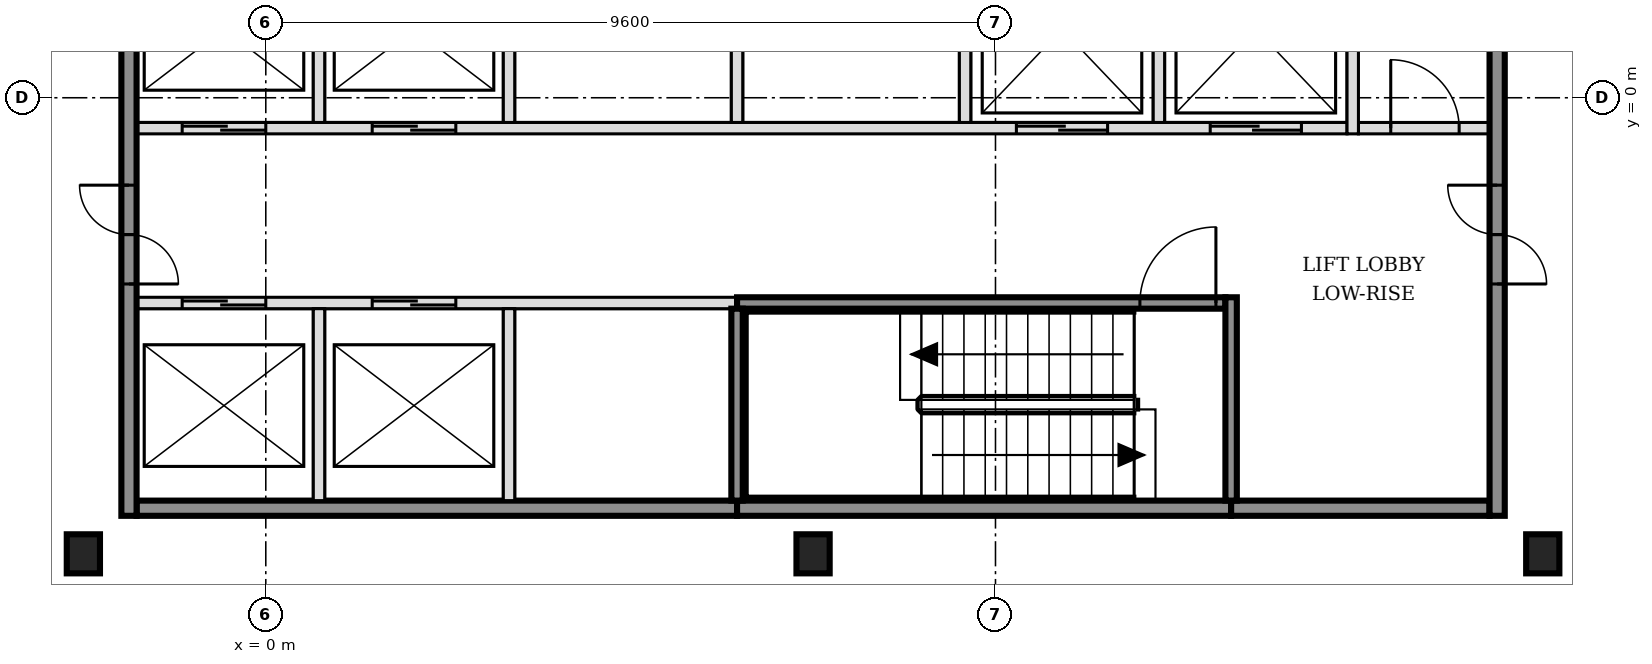
"""IFC4 building model, lengths in metres.
Left out: names, types, materials, properties, quantities, classifications, styles, units other than length and angle.
Written with IfcOpenShell. Run it as: python <this file> out.ifc"""

import sys

from ifc_helpers import new_model, si_unit, direction, frame, frame_2d, origin, origin_2d, place, context, subcontext, project, spatial, rectangle, i_section, extrude, element, fill, save


model = new_model("IFC4")
c1 = context("Model", 3, precision=1e-05, world=origin(), true_north=direction((0.0, 1.0)))
c2 = subcontext(c1, "Body", "Model", "MODEL_VIEW")
j1 = project(units=[si_unit("LENGTHUNIT", "METRE"), si_unit("PLANEANGLEUNIT", "RADIAN")], contexts=[c1])
p1 = place(None, origin())
s1 = spatial("IfcSite", under=j1, at=p1, CompositionType="ELEMENT")
p2 = place(p1, origin())
s2 = spatial("IfcBuilding", under=s1, at=p2, CompositionType="ELEMENT")
p3 = place(p2, frame((0.0, 0.0, 94.2)))
s3 = spatial("IfcBuildingStorey", under=s2, at=p3, CompositionType="ELEMENT", Elevation=94.2)
for number, where, z_axis, x_axis in (
    (1, (-2.4, -6.0, -0.15), (0.0, 0.0, 1.0), (1.0, 0.0, 0.0)),
    (2, (7.2, -6.0, -0.15), (0.0, 0.0, 1.0), (1.0, 0.0, 0.0)),
    (3, (16.8, -6.0, -0.15), (0.0, 0.0, 1.0), (1.0, 0.0, 0.0)),
):
    element("IfcColumn", number, at=place(p3, frame(where, z_axis=z_axis, x_axis=x_axis)), inside=s3, PredefinedType="COLUMN", context=c2, shape_type="SweptSolid", body=[
        extrude(i_section(OverallWidth=0.437, OverallDepth=0.514, WebThickness=0.061, FlangeThickness=0.097, FilletRadius=0.015, at=origin_2d()), origin(), (0.0, 0.0, 1.0), 3.6),
    ])
p4 = place(p3, frame((-1.7, -5.4, 0.0), z_axis=(0.0, 0.0, 1.0), x_axis=(1.0, 0.0, 0.0)))
e4 = element("IfcWall", 4, at=p4, inside=s3, PredefinedType="SOLIDWALL", context=c2, shape_type="SweptSolid", body=[
    extrude(rectangle(XDim=7.9, YDim=0.2, at=frame_2d((3.95, 0.0))), origin(), (0.0, 0.0, 1.0), 3.45),
])
p5 = place(p3, frame((6.2, -5.4, 0.0), z_axis=(0.0, 0.0, 1.0), x_axis=(1.0, 0.0, 0.0)))
e5 = element("IfcWall", 5, at=p5, inside=s3, PredefinedType="SOLIDWALL", context=c2, shape_type="SweptSolid", body=[
    extrude(rectangle(XDim=6.5, YDim=0.2, at=frame_2d((3.25, 0.0))), origin(), (0.0, 0.0, 1.0), 3.45),
])
p6 = place(p3, frame((12.7, -5.4, 0.0), z_axis=(0.0, 0.0, 1.0), x_axis=(1.0, 0.0, 0.0)))
e6 = element("IfcWall", 6, at=p6, inside=s3, PredefinedType="SOLIDWALL", context=c2, shape_type="SweptSolid", body=[
    extrude(rectangle(XDim=3.4, YDim=0.2, at=frame_2d((1.7, 0.0))), origin(), (0.0, 0.0, 1.0), 3.45),
])
p7 = place(p3, frame((-1.7, -2.7, 0.0), z_axis=(0.0, 0.0, 1.0), x_axis=(1.0, 0.0, 0.0)))
e7 = element("IfcWall", 7, at=p7, inside=s3, PredefinedType="SOLIDWALL", context=c2, shape_type="SweptSolid", body=[
    extrude(rectangle(XDim=7.9, YDim=0.15, at=frame_2d((3.95, 0.0))), origin(), (0.0, 0.0, 1.0), 3.45),
])
p8 = place(p7, frame((0.6, 0.0, 0.0)))
e8 = element("IfcOpeningElement", 8, at=p8, cuts=e7, PredefinedType="OPENING", context=c2, shape_type="SweptSolid", body=[
    extrude(rectangle(XDim=1.1, YDim=2.1, at=frame_2d((0.55, 1.05))), frame((0.0, 0.085, 0.0), z_axis=(0.0, -1.0, 0.0), x_axis=(1.0, 0.0, 0.0)), (0.0, 0.0, 1.0), 0.17),
])
p9 = place(p7, frame((3.1, 0.0, 0.0)))
e9 = element("IfcOpeningElement", 9, at=p9, cuts=e7, PredefinedType="OPENING", context=c2, shape_type="SweptSolid", body=[
    extrude(rectangle(XDim=1.1, YDim=2.1, at=frame_2d((0.55, 1.05))), frame((0.0, 0.085, 0.0), z_axis=(0.0, -1.0, 0.0), x_axis=(1.0, 0.0, 0.0)), (0.0, 0.0, 1.0), 0.17),
])
p10 = place(p3, frame((6.2, -2.7, 0.0), z_axis=(0.0, 0.0, 1.0), x_axis=(1.0, 0.0, 0.0)))
e10 = element("IfcWall", 10, at=p10, inside=s3, PredefinedType="SOLIDWALL", context=c2, shape_type="SweptSolid", body=[
    extrude(rectangle(XDim=6.425, YDim=0.15, at=frame_2d((3.212, 0.0))), origin(), (0.0, 0.0, 1.0), 3.45),
])
p11 = place(p10, frame((5.3, 0.0, 0.0)))
e11 = element("IfcOpeningElement", 11, at=p11, cuts=e10, PredefinedType="OPENING", context=c2, shape_type="SweptSolid", body=[
    extrude(rectangle(XDim=1.0, YDim=2.1, at=frame_2d((0.5, 1.05))), frame((0.0, 0.085, 0.0), z_axis=(0.0, -1.0, 0.0), x_axis=(1.0, 0.0, 0.0)), (0.0, 0.0, 1.0), 0.17),
])
p12 = place(p3, frame((-1.7, -0.4, 0.0), z_axis=(0.0, 0.0, 1.0), x_axis=(1.0, 0.0, 0.0)))
e12 = element("IfcWall", 12, at=p12, inside=s3, PredefinedType="SOLIDWALL", context=c2, shape_type="SweptSolid", body=[
    extrude(rectangle(XDim=15.925, YDim=0.15, at=frame_2d((7.962, 0.0))), origin(), (0.0, 0.0, 1.0), 3.45),
])
p13 = place(p12, frame((0.6, 0.0, 0.0)))
e13 = element("IfcOpeningElement", 13, at=p13, cuts=e12, PredefinedType="OPENING", context=c2, shape_type="SweptSolid", body=[
    extrude(rectangle(XDim=1.1, YDim=2.1, at=frame_2d((0.55, 1.05))), frame((0.0, 0.085, 0.0), z_axis=(0.0, -1.0, 0.0), x_axis=(1.0, 0.0, 0.0)), (0.0, 0.0, 1.0), 0.17),
])
p14 = place(p12, frame((3.1, 0.0, 0.0)))
e14 = element("IfcOpeningElement", 14, at=p14, cuts=e12, PredefinedType="OPENING", context=c2, shape_type="SweptSolid", body=[
    extrude(rectangle(XDim=1.1, YDim=2.1, at=frame_2d((0.55, 1.05))), frame((0.0, 0.085, 0.0), z_axis=(0.0, -1.0, 0.0), x_axis=(1.0, 0.0, 0.0)), (0.0, 0.0, 1.0), 0.17),
])
p15 = place(p12, frame((11.575, 0.0, 0.0)))
e15 = element("IfcOpeningElement", 15, at=p15, cuts=e12, PredefinedType="OPENING", context=c2, shape_type="SweptSolid", body=[
    extrude(rectangle(XDim=1.2, YDim=2.1, at=frame_2d((0.6, 1.05))), frame((0.0, 0.085, 0.0), z_axis=(0.0, -1.0, 0.0), x_axis=(1.0, 0.0, 0.0)), (0.0, 0.0, 1.0), 0.17),
])
p16 = place(p12, frame((14.125, 0.0, 0.0)))
e16 = element("IfcOpeningElement", 16, at=p16, cuts=e12, PredefinedType="OPENING", context=c2, shape_type="SweptSolid", body=[
    extrude(rectangle(XDim=1.2, YDim=2.1, at=frame_2d((0.6, 1.05))), frame((0.0, 0.085, 0.0), z_axis=(0.0, -1.0, 0.0), x_axis=(1.0, 0.0, 0.0)), (0.0, 0.0, 1.0), 0.17),
])
p17 = place(p3, frame((14.375, -0.4, 0.0), z_axis=(0.0, 0.0, 1.0), x_axis=(1.0, 0.0, 0.0)))
e17 = element("IfcWall", 17, at=p17, inside=s3, PredefinedType="PARTITIONING", context=c2, shape_type="SweptSolid", body=[
    extrude(rectangle(XDim=1.725, YDim=0.15, at=frame_2d((0.863, 0.0))), origin(), (0.0, 0.0, 1.0), 3.45),
])
p18 = place(p17, frame((0.425, 0.0, 0.0)))
e18 = element("IfcOpeningElement", 18, at=p18, cuts=e17, PredefinedType="OPENING", context=c2, shape_type="SweptSolid", body=[
    extrude(rectangle(XDim=0.9, YDim=2.1, at=frame_2d((0.45, 1.05))), frame((0.0, 0.085, 0.0), z_axis=(0.0, -1.0, 0.0), x_axis=(1.0, 0.0, 0.0)), (0.0, 0.0, 1.0), 0.17),
])
p19 = place(p3, frame((-1.8, -5.5, 0.0), z_axis=(0.0, 0.0, 1.0), x_axis=(0.0, 1.0, 0.0)))
e19 = element("IfcWall", 19, at=p19, inside=s3, PredefinedType="SOLIDWALL", context=c2, shape_type="SweptSolid", body=[
    extrude(rectangle(XDim=15.8, YDim=0.2, at=frame_2d((7.9, 0.0))), origin(), (0.0, 0.0, 1.0), 3.45),
])
p20 = place(p19, frame((3.05, 0.0, 0.0)))
e20 = element("IfcOpeningElement", 20, at=p20, cuts=e19, PredefinedType="OPENING", context=c2, shape_type="SweptSolid", body=[
    extrude(rectangle(XDim=1.3, YDim=2.1, at=frame_2d((0.65, 1.05))), frame((0.0, 0.11, 0.0), z_axis=(0.0, -1.0, 0.0), x_axis=(1.0, 0.0, 0.0)), (0.0, 0.0, 1.0), 0.22),
])
p21 = place(p19, frame((11.45, 0.0, 0.0)))
e21 = element("IfcOpeningElement", 21, at=p21, cuts=e19, PredefinedType="OPENING", context=c2, shape_type="SweptSolid", body=[
    extrude(rectangle(XDim=1.3, YDim=2.1, at=frame_2d((0.65, 1.05))), frame((0.0, 0.11, 0.0), z_axis=(0.0, -1.0, 0.0), x_axis=(1.0, 0.0, 0.0)), (0.0, 0.0, 1.0), 0.22),
])
p22 = place(p3, frame((0.7, -5.3, 0.0), z_axis=(0.0, 0.0, 1.0), x_axis=(0.0, 1.0, 0.0)))
e22 = element("IfcWall", 22, at=p22, inside=s3, PredefinedType="SOLIDWALL", context=c2, shape_type="SweptSolid", body=[
    extrude(rectangle(XDim=2.525, YDim=0.15, at=frame_2d((1.263, 0.0))), origin(), (0.0, 0.0, 1.0), 3.45),
])
p23 = place(p3, frame((0.7, -0.325, 0.0), z_axis=(0.0, 0.0, 1.0), x_axis=(0.0, 1.0, 0.0)))
e23 = element("IfcWall", 23, at=p23, inside=s3, PredefinedType="SOLIDWALL", context=c2, shape_type="SweptSolid", body=[
    extrude(rectangle(XDim=2.45, YDim=0.15, at=frame_2d((1.225, 0.0))), origin(), (0.0, 0.0, 1.0), 3.45),
])
p24 = place(p3, frame((3.2, -5.3, 0.0), z_axis=(0.0, 0.0, 1.0), x_axis=(0.0, 1.0, 0.0)))
e24 = element("IfcWall", 24, at=p24, inside=s3, PredefinedType="SOLIDWALL", context=c2, shape_type="SweptSolid", body=[
    extrude(rectangle(XDim=2.525, YDim=0.15, at=frame_2d((1.263, 0.0))), origin(), (0.0, 0.0, 1.0), 3.45),
])
p25 = place(p3, frame((3.2, -0.325, 0.0), z_axis=(0.0, 0.0, 1.0), x_axis=(0.0, 1.0, 0.0)))
e25 = element("IfcWall", 25, at=p25, inside=s3, PredefinedType="SOLIDWALL", context=c2, shape_type="SweptSolid", body=[
    extrude(rectangle(XDim=2.45, YDim=0.15, at=frame_2d((1.225, 0.0))), origin(), (0.0, 0.0, 1.0), 3.45),
])
p26 = place(p3, frame((6.2, -5.3, 0.0), z_axis=(0.0, 0.0, 1.0), x_axis=(0.0, 1.0, 0.0)))
e26 = element("IfcWall", 26, at=p26, inside=s3, PredefinedType="SOLIDWALL", context=c2, shape_type="SweptSolid", body=[
    extrude(rectangle(XDim=2.525, YDim=0.15, at=frame_2d((1.263, 0.0))), origin(), (0.0, 0.0, 1.0), 3.45),
])
for number, where, z_axis, x_axis in (
    (27, (6.2, -0.325, 0.0), (0.0, 0.0, 1.0), (0.0, 1.0, 0.0)),
    (28, (9.2, -0.325, 0.0), (0.0, 0.0, 1.0), (0.0, 1.0, 0.0)),
    (29, (11.75, -0.325, 0.0), (0.0, 0.0, 1.0), (0.0, 1.0, 0.0)),
):
    element("IfcWall", number, at=place(p3, frame(where, z_axis=z_axis, x_axis=x_axis)), inside=s3, PredefinedType="SOLIDWALL", context=c2, shape_type="SweptSolid", body=[
        extrude(rectangle(XDim=2.45, YDim=0.15, at=frame_2d((1.225, 0.0))), origin(), (0.0, 0.0, 1.0), 3.45),
    ])
p27 = place(p3, frame((12.7, -5.3, 0.0), z_axis=(0.0, 0.0, 1.0), x_axis=(0.0, 1.0, 0.0)))
e30 = element("IfcWall", 30, at=p27, inside=s3, PredefinedType="SOLIDWALL", context=c2, shape_type="SweptSolid", body=[
    extrude(rectangle(XDim=2.675, YDim=0.15, at=frame_2d((1.337, 0.0))), origin(), (0.0, 0.0, 1.0), 3.45),
])
p28 = place(p3, frame((14.3, -0.475, 0.0), z_axis=(0.0, 0.0, 1.0), x_axis=(0.0, 1.0, 0.0)))
e31 = element("IfcWall", 31, at=p28, inside=s3, PredefinedType="SOLIDWALL", context=c2, shape_type="SweptSolid", body=[
    extrude(rectangle(XDim=2.75, YDim=0.15, at=frame_2d((1.375, 0.0))), origin(), (0.0, 0.0, 1.0), 3.45),
])
p29 = place(p3, frame((16.2, -5.5, 0.0), z_axis=(0.0, 0.0, 1.0), x_axis=(0.0, 1.0, 0.0)))
e32 = element("IfcWall", 32, at=p29, inside=s3, PredefinedType="SOLIDWALL", context=c2, shape_type="SweptSolid", body=[
    extrude(rectangle(XDim=15.8, YDim=0.2, at=frame_2d((7.9, 0.0))), origin(), (0.0, 0.0, 1.0), 3.45),
])
p30 = place(p29, frame((3.05, 0.0, 0.0)))
e33 = element("IfcOpeningElement", 33, at=p30, cuts=e32, PredefinedType="OPENING", context=c2, shape_type="SweptSolid", body=[
    extrude(rectangle(XDim=1.3, YDim=2.1, at=frame_2d((0.65, 1.05))), frame((0.0, 0.11, 0.0), z_axis=(0.0, -1.0, 0.0), x_axis=(1.0, 0.0, 0.0)), (0.0, 0.0, 1.0), 0.22),
])
p31 = place(p29, frame((11.45, 0.0, 0.0)))
e34 = element("IfcOpeningElement", 34, at=p31, cuts=e32, PredefinedType="OPENING", context=c2, shape_type="SweptSolid", body=[
    extrude(rectangle(XDim=1.3, YDim=2.1, at=frame_2d((0.65, 1.05))), frame((0.0, 0.11, 0.0), z_axis=(0.0, -1.0, 0.0), x_axis=(1.0, 0.0, 0.0)), (0.0, 0.0, 1.0), 0.22),
])
p32 = place(p8, origin())
e35 = element("IfcDoor", 35, at=p32, inside=s3, OperationType="DOUBLE_DOOR_SLIDING", PredefinedType="DOOR", context=c2, shape_type="SweptSolid", body=[
    extrude(rectangle(XDim=1.1, YDim=2.1, at=frame_2d((0.55, 1.05))), frame((0.0, 0.025, 0.0), z_axis=(0.0, -1.0, 0.0), x_axis=(1.0, 0.0, 0.0)), (0.0, 0.0, 1.0), 0.05),
])
fill(e8, e35)
p33 = place(p9, origin())
e36 = element("IfcDoor", 36, at=p33, inside=s3, OperationType="DOUBLE_DOOR_SLIDING", PredefinedType="DOOR", context=c2, shape_type="SweptSolid", body=[
    extrude(rectangle(XDim=1.1, YDim=2.1, at=frame_2d((0.55, 1.05))), frame((0.0, 0.025, 0.0), z_axis=(0.0, -1.0, 0.0), x_axis=(1.0, 0.0, 0.0)), (0.0, 0.0, 1.0), 0.05),
])
fill(e9, e36)
p34 = place(p13, origin())
e37 = element("IfcDoor", 37, at=p34, inside=s3, OperationType="DOUBLE_DOOR_SLIDING", PredefinedType="DOOR", context=c2, shape_type="SweptSolid", body=[
    extrude(rectangle(XDim=1.1, YDim=2.1, at=frame_2d((0.55, 1.05))), frame((0.0, 0.025, 0.0), z_axis=(0.0, -1.0, 0.0), x_axis=(1.0, 0.0, 0.0)), (0.0, 0.0, 1.0), 0.05),
])
fill(e13, e37)
p35 = place(p14, origin())
e38 = element("IfcDoor", 38, at=p35, inside=s3, OperationType="DOUBLE_DOOR_SLIDING", PredefinedType="DOOR", context=c2, shape_type="SweptSolid", body=[
    extrude(rectangle(XDim=1.1, YDim=2.1, at=frame_2d((0.55, 1.05))), frame((0.0, 0.025, 0.0), z_axis=(0.0, -1.0, 0.0), x_axis=(1.0, 0.0, 0.0)), (0.0, 0.0, 1.0), 0.05),
])
fill(e14, e38)
p36 = place(p15, origin())
e39 = element("IfcDoor", 39, at=p36, inside=s3, OperationType="DOUBLE_DOOR_SLIDING", PredefinedType="DOOR", context=c2, shape_type="SweptSolid", body=[
    extrude(rectangle(XDim=1.2, YDim=2.1, at=frame_2d((0.6, 1.05))), frame((0.0, 0.025, 0.0), z_axis=(0.0, -1.0, 0.0), x_axis=(1.0, 0.0, 0.0)), (0.0, 0.0, 1.0), 0.05),
])
fill(e15, e39)
p37 = place(p16, origin())
e40 = element("IfcDoor", 40, at=p37, inside=s3, OperationType="DOUBLE_DOOR_SLIDING", PredefinedType="DOOR", context=c2, shape_type="SweptSolid", body=[
    extrude(rectangle(XDim=1.2, YDim=2.1, at=frame_2d((0.6, 1.05))), frame((0.0, 0.025, 0.0), z_axis=(0.0, -1.0, 0.0), x_axis=(1.0, 0.0, 0.0)), (0.0, 0.0, 1.0), 0.05),
])
fill(e16, e40)
p38 = place(p11, origin())
e41 = element("IfcDoor", 41, at=p38, inside=s3, OperationType="SINGLE_SWING_RIGHT", PredefinedType="DOOR", context=c2, shape_type="SweptSolid", body=[
    extrude(rectangle(XDim=1.0, YDim=2.1, at=frame_2d((0.5, 1.05))), frame((0.0, 0.025, 0.0), z_axis=(0.0, -1.0, 0.0), x_axis=(1.0, 0.0, 0.0)), (0.0, 0.0, 1.0), 0.05),
])
fill(e11, e41)
p39 = place(p20, origin())
e42 = element("IfcDoor", 42, at=p39, inside=s3, OperationType="DOUBLE_DOOR_SINGLE_SWING", PredefinedType="DOOR", context=c2, shape_type="SweptSolid", body=[
    extrude(rectangle(XDim=1.3, YDim=2.1, at=frame_2d((0.65, 1.05))), frame((0.0, 0.025, 0.0), z_axis=(0.0, -1.0, 0.0), x_axis=(1.0, 0.0, 0.0)), (0.0, 0.0, 1.0), 0.05),
])
fill(e20, e42)
p40 = place(p30, origin())
e43 = element("IfcDoor", 43, at=p40, inside=s3, OperationType="DOUBLE_DOOR_SINGLE_SWING", PredefinedType="DOOR", context=c2, shape_type="SweptSolid", body=[
    extrude(rectangle(XDim=1.3, YDim=2.1, at=frame_2d((0.65, 1.05))), frame((0.0, 0.025, 0.0), z_axis=(0.0, -1.0, 0.0), x_axis=(1.0, 0.0, 0.0)), (0.0, 0.0, 1.0), 0.05),
])
fill(e33, e43)
p41 = place(p18, origin())
e44 = element("IfcDoor", 44, at=p41, inside=s3, OperationType="SINGLE_SWING_LEFT", PredefinedType="DOOR", context=c2, shape_type="SweptSolid", body=[
    extrude(rectangle(XDim=0.9, YDim=2.1, at=frame_2d((0.45, 1.05))), frame((0.0, 0.025, 0.0), z_axis=(0.0, -1.0, 0.0), x_axis=(1.0, 0.0, 0.0)), (0.0, 0.0, 1.0), 0.05),
])
fill(e18, e44)
save(model, sys.argv[1])
